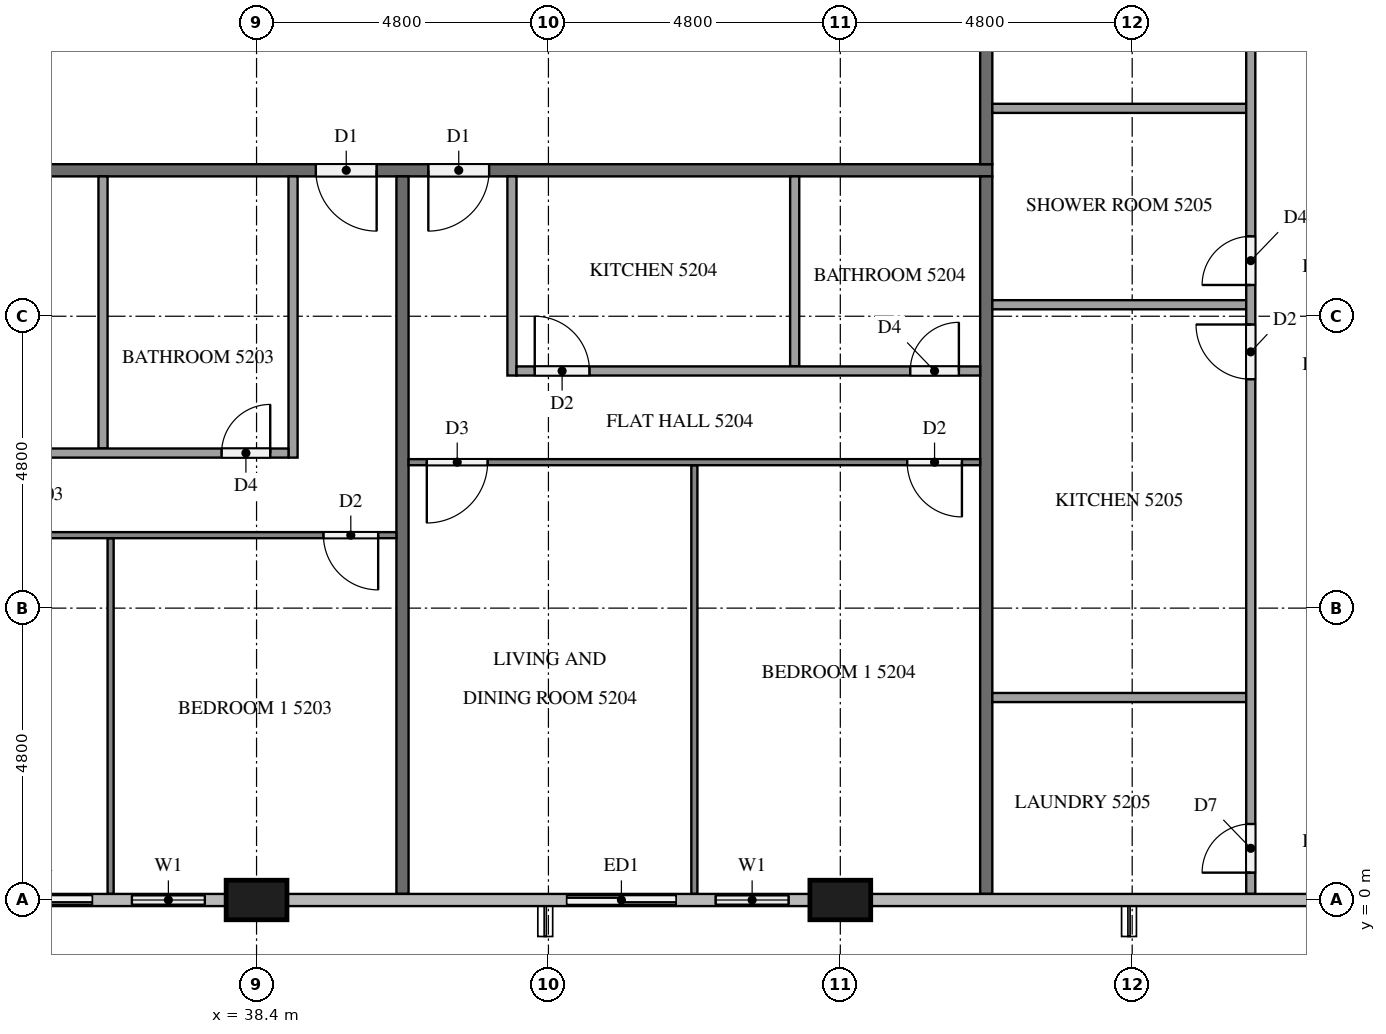
"""IFC4 building model, lengths in metres.
Left out: names, types, materials, properties, quantities, classifications, styles, units other than length and angle.
Written with IfcOpenShell. Run it as: python <this file> out.ifc"""

import sys

from ifc_helpers import new_model, si_unit, direction, frame, frame_2d, origin, origin_2d, place, context, subcontext, project, spatial, rectangle, extrude, element, fill, save


model = new_model("IFC4")
c1 = context("Model", 3, precision=1e-05, world=origin(), true_north=direction((0.0, 1.0)))
c2 = subcontext(c1, "Body", "Model", "MODEL_VIEW")
j1 = project(units=[si_unit("LENGTHUNIT", "METRE"), si_unit("PLANEANGLEUNIT", "RADIAN")], contexts=[c1])
p1 = place(None, origin())
s1 = spatial("IfcSite", under=j1, at=p1, CompositionType="ELEMENT")
p2 = place(p1, origin())
s2 = spatial("IfcBuilding", under=s1, at=p2, CompositionType="ELEMENT")
p3 = place(p2, frame((0.0, 0.0, 199.9)))
s3 = spatial("IfcBuildingStorey", under=s2, at=p3, CompositionType="ELEMENT", Elevation=199.9)
for number, where, z_axis, x_axis in (
    (1, (38.4, 0.0, 0.0), (0.0, 0.0, 1.0), (1.0, 0.0, 0.0)),
    (2, (48.0, 0.0, 0.0), (0.0, 0.0, 1.0), (1.0, 0.0, 0.0)),
):
    element("IfcColumn", number, at=place(p3, frame(where, z_axis=z_axis, x_axis=x_axis)), inside=s3, PredefinedType="COLUMN", context=c2, shape_type="SweptSolid", body=[
        extrude(rectangle(XDim=1.0, YDim=0.65, at=origin_2d()), origin(), (0.0, 0.0, 1.0), 3.1),
    ])
p4 = place(p3, frame((33.6, 0.0, 0.0), z_axis=(0.0, 0.0, 1.0), x_axis=(1.0, 0.0, 0.0)))
e3 = element("IfcWall", 3, at=p4, inside=s3, PredefinedType="SOLIDWALL", context=c2, shape_type="SweptSolid", body=[
    extrude(rectangle(XDim=4.3, YDim=0.15, at=frame_2d((2.15, 0.0))), origin(), (0.0, 0.0, 1.0), 3.1),
])
p5 = place(p4, frame((0.3, 0.0, 0.0)))
e4 = element("IfcOpeningElement", 4, at=p5, cuts=e3, PredefinedType="OPENING", context=c2, shape_type="SweptSolid", body=[
    extrude(rectangle(XDim=1.8, YDim=2.4, at=frame_2d((0.9, 1.2))), frame((0.0, 0.085, 0.0), z_axis=(0.0, -1.0, 0.0), x_axis=(1.0, 0.0, 0.0)), (0.0, 0.0, 1.0), 0.17),
])
p6 = place(p4, frame((2.75, 0.0, 0.9)))
e5 = element("IfcOpeningElement", 5, at=p6, cuts=e3, PredefinedType="OPENING", context=c2, shape_type="SweptSolid", body=[
    extrude(rectangle(XDim=1.2, YDim=1.4, at=frame_2d((0.6, 0.7))), frame((0.0, 0.085, 0.0), z_axis=(0.0, -1.0, 0.0), x_axis=(1.0, 0.0, 0.0)), (0.0, 0.0, 1.0), 0.17),
])
p7 = place(p3, frame((43.2, 0.0, 0.0), z_axis=(0.0, 0.0, 1.0), x_axis=(1.0, 0.0, 0.0)))
e6 = element("IfcWall", 6, at=p7, inside=s3, PredefinedType="SOLIDWALL", context=c2, shape_type="SweptSolid", body=[
    extrude(rectangle(XDim=4.3, YDim=0.15, at=frame_2d((2.15, 0.0))), origin(), (0.0, 0.0, 1.0), 3.1),
])
p8 = place(p7, frame((0.3, 0.0, 0.0)))
e7 = element("IfcOpeningElement", 7, at=p8, cuts=e6, PredefinedType="OPENING", context=c2, shape_type="SweptSolid", body=[
    extrude(rectangle(XDim=1.8, YDim=2.4, at=frame_2d((0.9, 1.2))), frame((0.0, 0.085, 0.0), z_axis=(0.0, -1.0, 0.0), x_axis=(1.0, 0.0, 0.0)), (0.0, 0.0, 1.0), 0.17),
])
p9 = place(p7, frame((2.75, 0.0, 0.9)))
e8 = element("IfcOpeningElement", 8, at=p9, cuts=e6, PredefinedType="OPENING", context=c2, shape_type="SweptSolid", body=[
    extrude(rectangle(XDim=1.2, YDim=1.4, at=frame_2d((0.6, 0.7))), frame((0.0, 0.085, 0.0), z_axis=(0.0, -1.0, 0.0), x_axis=(1.0, 0.0, 0.0)), (0.0, 0.0, 1.0), 0.17),
])
p10 = place(p3, frame((50.5, 12.0, 0.0), z_axis=(0.0, 0.0, 1.0), x_axis=(-1.0, 0.0, 0.0)))
e9 = element("IfcWall", 9, at=p10, inside=s3, PredefinedType="PARTITIONING", context=c2, shape_type="SweptSolid", body=[
    extrude(rectangle(XDim=38.6, YDim=0.2, at=frame_2d((19.3, 0.0))), origin(), (0.0, 0.0, 1.0), 3.1),
])
p11 = place(p10, frame((26.875, 0.0, 0.0)))
e10 = element("IfcOpeningElement", 10, at=p11, cuts=e9, PredefinedType="OPENING", context=c2, shape_type="SweptSolid", body=[
    extrude(rectangle(XDim=1.1, YDim=2.1, at=frame_2d((0.55, 1.05))), frame((0.0, 0.11, 0.0), z_axis=(0.0, -1.0, 0.0), x_axis=(1.0, 0.0, 0.0)), (0.0, 0.0, 1.0), 0.22),
])
p12 = place(p10, frame((25.075, 0.0, 0.0)))
e11 = element("IfcOpeningElement", 11, at=p12, cuts=e9, PredefinedType="OPENING", context=c2, shape_type="SweptSolid", body=[
    extrude(rectangle(XDim=1.0, YDim=2.1, at=frame_2d((0.5, 1.05))), frame((0.0, 0.11, 0.0), z_axis=(0.0, -1.0, 0.0), x_axis=(1.0, 0.0, 0.0)), (0.0, 0.0, 1.0), 0.22),
])
p13 = place(p10, frame((10.125, 0.0, 0.0)))
e12 = element("IfcOpeningElement", 12, at=p13, cuts=e9, PredefinedType="OPENING", context=c2, shape_type="SweptSolid", body=[
    extrude(rectangle(XDim=1.0, YDim=2.1, at=frame_2d((0.5, 1.05))), frame((0.0, 0.11, 0.0), z_axis=(0.0, -1.0, 0.0), x_axis=(1.0, 0.0, 0.0)), (0.0, 0.0, 1.0), 0.22),
])
p14 = place(p10, frame((8.275, 0.0, 0.0)))
e13 = element("IfcOpeningElement", 13, at=p14, cuts=e9, PredefinedType="OPENING", context=c2, shape_type="SweptSolid", body=[
    extrude(rectangle(XDim=1.0, YDim=2.1, at=frame_2d((0.5, 1.05))), frame((0.0, 0.11, 0.0), z_axis=(0.0, -1.0, 0.0), x_axis=(1.0, 0.0, 0.0)), (0.0, 0.0, 1.0), 0.22),
])
p15 = place(p3, frame((50.4, 40.7, 0.0), z_axis=(0.0, 0.0, 1.0), x_axis=(0.0, -1.0, 0.0)))
e14 = element("IfcWall", 14, at=p15, inside=s3, PredefinedType="PARTITIONING", context=c2, shape_type="SweptSolid", body=[
    extrude(rectangle(XDim=28.6, YDim=0.2, at=frame_2d((14.3, 0.0))), origin(), (0.0, 0.0, 1.0), 3.1),
])
p16 = place(p15, frame((21.875, 0.0, 0.0)))
e15 = element("IfcOpeningElement", 15, at=p16, cuts=e14, PredefinedType="OPENING", context=c2, shape_type="SweptSolid", body=[
    extrude(rectangle(XDim=1.1, YDim=2.1, at=frame_2d((0.55, 1.05))), frame((0.0, 0.11, 0.0), z_axis=(0.0, -1.0, 0.0), x_axis=(1.0, 0.0, 0.0)), (0.0, 0.0, 1.0), 0.22),
])
p17 = place(p15, frame((7.525, 0.0, 0.0)))
e16 = element("IfcOpeningElement", 16, at=p17, cuts=e14, PredefinedType="OPENING", context=c2, shape_type="SweptSolid", body=[
    extrude(rectangle(XDim=1.0, YDim=2.1, at=frame_2d((0.5, 1.05))), frame((0.0, 0.11, 0.0), z_axis=(0.0, -1.0, 0.0), x_axis=(1.0, 0.0, 0.0)), (0.0, 0.0, 1.0), 0.22),
])
p18 = place(p15, frame((5.675, 0.0, 0.0)))
e17 = element("IfcOpeningElement", 17, at=p18, cuts=e14, PredefinedType="OPENING", context=c2, shape_type="SweptSolid", body=[
    extrude(rectangle(XDim=1.0, YDim=2.1, at=frame_2d((0.5, 1.05))), frame((0.0, 0.11, 0.0), z_axis=(0.0, -1.0, 0.0), x_axis=(1.0, 0.0, 0.0)), (0.0, 0.0, 1.0), 0.22),
])
for number, where, z_axis, x_axis in (
    (18, (40.8, 11.9, 0.0), (0.0, 0.0, 1.0), (0.0, -1.0, 0.0)),
    (19, (50.4, 11.9, 0.0), (0.0, 0.0, 1.0), (0.0, -1.0, 0.0)),
):
    element("IfcWall", number, at=place(p3, frame(where, z_axis=z_axis, x_axis=x_axis)), inside=s3, PredefinedType="PARTITIONING", context=c2, shape_type="SweptSolid", body=[
        extrude(rectangle(XDim=11.8, YDim=0.2, at=frame_2d((5.9, 0.0))), origin(), (0.0, 0.0, 1.0), 3.1),
    ])
p19 = place(p3, frame((36.0, 5.95, 0.0), z_axis=(0.0, 0.0, 1.0), x_axis=(0.0, -1.0, 0.0)))
e20 = element("IfcWall", 20, at=p19, inside=s3, PredefinedType="PARTITIONING", context=c2, shape_type="SweptSolid", body=[
    extrude(rectangle(XDim=5.85, YDim=0.1, at=frame_2d((2.925, 0.0))), origin(), (0.0, 0.0, 1.0), 3.1),
])
p20 = place(p3, frame((40.7, 6.0, 0.0), z_axis=(0.0, 0.0, 1.0), x_axis=(-1.0, 0.0, 0.0)))
e21 = element("IfcWall", 21, at=p20, inside=s3, PredefinedType="PARTITIONING", context=c2, shape_type="SweptSolid", body=[
    extrude(rectangle(XDim=9.4, YDim=0.1, at=frame_2d((4.7, 0.0))), origin(), (0.0, 0.0, 1.0), 3.1),
])
p21 = place(p20, frame((0.3, 0.0, 0.0)))
e22 = element("IfcOpeningElement", 22, at=p21, cuts=e21, PredefinedType="OPENING", context=c2, shape_type="SweptSolid", body=[
    extrude(rectangle(XDim=0.9, YDim=2.1, at=frame_2d((0.45, 1.05))), frame((0.0, 0.06, 0.0), z_axis=(0.0, -1.0, 0.0), x_axis=(1.0, 0.0, 0.0)), (0.0, 0.0, 1.0), 0.12),
])
p22 = place(p20, frame((8.1, 0.0, 0.0)))
e23 = element("IfcOpeningElement", 23, at=p22, cuts=e21, PredefinedType="OPENING", context=c2, shape_type="SweptSolid", body=[
    extrude(rectangle(XDim=1.0, YDim=2.1, at=frame_2d((0.5, 1.05))), frame((0.0, 0.06, 0.0), z_axis=(0.0, -1.0, 0.0), x_axis=(1.0, 0.0, 0.0)), (0.0, 0.0, 1.0), 0.12),
])
p23 = place(p3, frame((35.875, 11.9, 0.0), z_axis=(0.0, 0.0, 1.0), x_axis=(0.0, -1.0, 0.0)))
e24 = element("IfcWall", 24, at=p23, inside=s3, PredefinedType="PARTITIONING", context=c2, shape_type="SweptSolid", body=[
    extrude(rectangle(XDim=4.475, YDim=0.15, at=frame_2d((2.237, 0.0))), origin(), (0.0, 0.0, 1.0), 3.1),
])
p24 = place(p3, frame((39.0, 11.9, 0.0), z_axis=(0.0, 0.0, 1.0), x_axis=(0.0, -1.0, 0.0)))
e25 = element("IfcWall", 25, at=p24, inside=s3, PredefinedType="PARTITIONING", context=c2, shape_type="SweptSolid", body=[
    extrude(rectangle(XDim=4.625, YDim=0.15, at=frame_2d((2.312, 0.0))), origin(), (0.0, 0.0, 1.0), 3.1),
])
p25 = place(p3, frame((31.3, 7.35, 0.0), z_axis=(0.0, 0.0, 1.0), x_axis=(1.0, 0.0, 0.0)))
e26 = element("IfcWall", 26, at=p25, inside=s3, PredefinedType="PARTITIONING", context=c2, shape_type="SweptSolid", body=[
    extrude(rectangle(XDim=7.625, YDim=0.15, at=frame_2d((3.812, 0.0))), origin(), (0.0, 0.0, 1.0), 3.1),
])
p26 = place(p25, frame((6.525, 0.0, 0.0)))
e27 = element("IfcOpeningElement", 27, at=p26, cuts=e26, PredefinedType="OPENING", context=c2, shape_type="SweptSolid", body=[
    extrude(rectangle(XDim=0.8, YDim=2.1, at=frame_2d((0.4, 1.05))), frame((0.0, 0.085, 0.0), z_axis=(0.0, -1.0, 0.0), x_axis=(1.0, 0.0, 0.0)), (0.0, 0.0, 1.0), 0.17),
])
p27 = place(p25, frame((0.35, 0.0, 0.0)))
e28 = element("IfcOpeningElement", 28, at=p27, cuts=e26, PredefinedType="OPENING", context=c2, shape_type="SweptSolid", body=[
    extrude(rectangle(XDim=0.9, YDim=2.1, at=frame_2d((0.45, 1.05))), frame((0.0, 0.085, 0.0), z_axis=(0.0, -1.0, 0.0), x_axis=(1.0, 0.0, 0.0)), (0.0, 0.0, 1.0), 0.17),
])
p28 = place(p3, frame((45.6, 7.15, 0.0), z_axis=(0.0, 0.0, 1.0), x_axis=(0.0, -1.0, 0.0)))
e29 = element("IfcWall", 29, at=p28, inside=s3, PredefinedType="PARTITIONING", context=c2, shape_type="SweptSolid", body=[
    extrude(rectangle(XDim=7.05, YDim=0.1, at=frame_2d((3.525, 0.0))), origin(), (0.0, 0.0, 1.0), 3.1),
])
p29 = place(p3, frame((50.3, 7.2, 0.0), z_axis=(0.0, 0.0, 1.0), x_axis=(-1.0, 0.0, 0.0)))
e30 = element("IfcWall", 30, at=p29, inside=s3, PredefinedType="PARTITIONING", context=c2, shape_type="SweptSolid", body=[
    extrude(rectangle(XDim=9.4, YDim=0.1, at=frame_2d((4.7, 0.0))), origin(), (0.0, 0.0, 1.0), 3.1),
])
p30 = place(p29, frame((8.1, 0.0, 0.0)))
e31 = element("IfcOpeningElement", 31, at=p30, cuts=e30, PredefinedType="OPENING", context=c2, shape_type="SweptSolid", body=[
    extrude(rectangle(XDim=1.0, YDim=2.1, at=frame_2d((0.5, 1.05))), frame((0.0, 0.06, 0.0), z_axis=(0.0, -1.0, 0.0), x_axis=(1.0, 0.0, 0.0)), (0.0, 0.0, 1.0), 0.12),
])
p31 = place(p29, frame((0.3, 0.0, 0.0)))
e32 = element("IfcOpeningElement", 32, at=p31, cuts=e30, PredefinedType="OPENING", context=c2, shape_type="SweptSolid", body=[
    extrude(rectangle(XDim=0.9, YDim=2.1, at=frame_2d((0.45, 1.05))), frame((0.0, 0.06, 0.0), z_axis=(0.0, -1.0, 0.0), x_axis=(1.0, 0.0, 0.0)), (0.0, 0.0, 1.0), 0.12),
])
p32 = place(p3, frame((47.25, 11.9, 0.0), z_axis=(0.0, 0.0, 1.0), x_axis=(0.0, -1.0, 0.0)))
e33 = element("IfcWall", 33, at=p32, inside=s3, PredefinedType="PARTITIONING", context=c2, shape_type="SweptSolid", body=[
    extrude(rectangle(XDim=3.125, YDim=0.15, at=frame_2d((1.562, 0.0))), origin(), (0.0, 0.0, 1.0), 3.1),
])
p33 = place(p3, frame((42.6, 11.9, 0.0), z_axis=(0.0, 0.0, 1.0), x_axis=(0.0, -1.0, 0.0)))
e34 = element("IfcWall", 34, at=p33, inside=s3, PredefinedType="PARTITIONING", context=c2, shape_type="SweptSolid", body=[
    extrude(rectangle(XDim=3.275, YDim=0.15, at=frame_2d((1.637, 0.0))), origin(), (0.0, 0.0, 1.0), 3.1),
])
p34 = place(p3, frame((42.675, 8.7, 0.0), z_axis=(0.0, 0.0, 1.0), x_axis=(1.0, 0.0, 0.0)))
e35 = element("IfcWall", 35, at=p34, inside=s3, PredefinedType="PARTITIONING", context=c2, shape_type="SweptSolid", body=[
    extrude(rectangle(XDim=7.625, YDim=0.15, at=frame_2d((3.812, 0.0))), origin(), (0.0, 0.0, 1.0), 3.1),
])
p35 = place(p34, frame((0.3, 0.0, 0.0)))
e36 = element("IfcOpeningElement", 36, at=p35, cuts=e35, PredefinedType="OPENING", context=c2, shape_type="SweptSolid", body=[
    extrude(rectangle(XDim=0.9, YDim=2.1, at=frame_2d((0.45, 1.05))), frame((0.0, 0.085, 0.0), z_axis=(0.0, -1.0, 0.0), x_axis=(1.0, 0.0, 0.0)), (0.0, 0.0, 1.0), 0.17),
])
p36 = place(p34, frame((6.475, 0.0, 0.0)))
e37 = element("IfcOpeningElement", 37, at=p36, cuts=e35, PredefinedType="OPENING", context=c2, shape_type="SweptSolid", body=[
    extrude(rectangle(XDim=0.8, YDim=2.1, at=frame_2d((0.4, 1.05))), frame((0.0, 0.085, 0.0), z_axis=(0.0, -1.0, 0.0), x_axis=(1.0, 0.0, 0.0)), (0.0, 0.0, 1.0), 0.17),
])
for number, where, z_axis, x_axis in (
    (38, (50.5, 13.019, 0.0), (0.0, 0.0, 1.0), (1.0, 0.0, 0.0)),
    (39, (50.5, 9.789, 0.0), (0.0, 0.0, 1.0), (1.0, 0.0, 0.0)),
    (40, (50.5, 3.33, 0.0), (0.0, 0.0, 1.0), (1.0, 0.0, 0.0)),
):
    element("IfcWall", number, at=place(p3, frame(where, z_axis=z_axis, x_axis=x_axis)), inside=s3, PredefinedType="PARTITIONING", context=c2, shape_type="SweptSolid", body=[
        extrude(rectangle(XDim=4.175, YDim=0.15, at=frame_2d((2.087, 0.0))), origin(), (0.0, 0.0, 1.0), 3.1),
    ])
p37 = place(p3, frame((54.75, 0.1, 0.0), z_axis=(0.0, 0.0, 1.0), x_axis=(0.0, 1.0, 0.0)))
e41 = element("IfcWall", 41, at=p37, inside=s3, PredefinedType="PARTITIONING", context=c2, shape_type="SweptSolid", body=[
    extrude(rectangle(XDim=17.225, YDim=0.15, at=frame_2d((8.612, 0.0))), origin(), (0.0, 0.0, 1.0), 3.1),
])
p38 = place(p37, frame((16.025, 0.0, 0.0)))
e42 = element("IfcOpeningElement", 42, at=p38, cuts=e41, PredefinedType="OPENING", context=c2, shape_type="SweptSolid", body=[
    extrude(rectangle(XDim=0.9, YDim=2.1, at=frame_2d((0.45, 1.05))), frame((0.0, 0.085, 0.0), z_axis=(0.0, -1.0, 0.0), x_axis=(1.0, 0.0, 0.0)), (0.0, 0.0, 1.0), 0.17),
])
p39 = place(p37, frame((10.014, 0.0, 0.0)))
e43 = element("IfcOpeningElement", 43, at=p39, cuts=e41, PredefinedType="OPENING", context=c2, shape_type="SweptSolid", body=[
    extrude(rectangle(XDim=0.8, YDim=2.1, at=frame_2d((0.4, 1.05))), frame((0.0, 0.085, 0.0), z_axis=(0.0, -1.0, 0.0), x_axis=(1.0, 0.0, 0.0)), (0.0, 0.0, 1.0), 0.17),
])
p40 = place(p37, frame((8.464, 0.0, 0.0)))
e44 = element("IfcOpeningElement", 44, at=p40, cuts=e41, PredefinedType="OPENING", context=c2, shape_type="SweptSolid", body=[
    extrude(rectangle(XDim=0.9, YDim=2.1, at=frame_2d((0.45, 1.05))), frame((0.0, 0.085, 0.0), z_axis=(0.0, -1.0, 0.0), x_axis=(1.0, 0.0, 0.0)), (0.0, 0.0, 1.0), 0.17),
])
p41 = place(p37, frame((0.35, 0.0, 0.0)))
e45 = element("IfcOpeningElement", 45, at=p41, cuts=e41, PredefinedType="OPENING", context=c2, shape_type="SweptSolid", body=[
    extrude(rectangle(XDim=0.8, YDim=2.1, at=frame_2d((0.4, 1.05))), frame((0.0, 0.085, 0.0), z_axis=(0.0, -1.0, 0.0), x_axis=(1.0, 0.0, 0.0)), (0.0, 0.0, 1.0), 0.17),
])
p42 = place(p5, origin())
e46 = element("IfcDoor", 46, at=p42, inside=s3, OperationType="SLIDING_TO_RIGHT", PredefinedType="DOOR", context=c2, shape_type="SweptSolid", body=[
    extrude(rectangle(XDim=1.8, YDim=2.4, at=frame_2d((0.9, 1.2))), frame((0.0, 0.025, 0.0), z_axis=(0.0, -1.0, 0.0), x_axis=(1.0, 0.0, 0.0)), (0.0, 0.0, 1.0), 0.05),
])
fill(e4, e46)
p43 = place(p6, origin())
e47 = element("IfcWindow", 47, at=p43, inside=s3, PartitioningType="SINGLE_PANEL", PredefinedType="WINDOW", context=c2, shape_type="SweptSolid", body=[
    extrude(rectangle(XDim=1.2, YDim=1.4, at=frame_2d((0.6, 0.7))), frame((0.0, 0.03, 0.0), z_axis=(0.0, -1.0, 0.0), x_axis=(1.0, 0.0, 0.0)), (0.0, 0.0, 1.0), 0.06),
])
fill(e5, e47)
p44 = place(p8, origin())
e48 = element("IfcDoor", 48, at=p44, inside=s3, OperationType="SLIDING_TO_LEFT", PredefinedType="DOOR", context=c2, shape_type="SweptSolid", body=[
    extrude(rectangle(XDim=1.8, YDim=2.4, at=frame_2d((0.9, 1.2))), frame((0.0, 0.025, 0.0), z_axis=(0.0, -1.0, 0.0), x_axis=(1.0, 0.0, 0.0)), (0.0, 0.0, 1.0), 0.05),
])
fill(e7, e48)
p45 = place(p9, origin())
e49 = element("IfcWindow", 49, at=p45, inside=s3, PartitioningType="SINGLE_PANEL", PredefinedType="WINDOW", context=c2, shape_type="SweptSolid", body=[
    extrude(rectangle(XDim=1.2, YDim=1.4, at=frame_2d((0.6, 0.7))), frame((0.0, 0.03, 0.0), z_axis=(0.0, -1.0, 0.0), x_axis=(1.0, 0.0, 0.0)), (0.0, 0.0, 1.0), 0.06),
])
fill(e8, e49)
p46 = place(p13, origin())
e50 = element("IfcDoor", 50, at=p46, inside=s3, OperationType="SINGLE_SWING_LEFT", PredefinedType="DOOR", context=c2, shape_type="SweptSolid", body=[
    extrude(rectangle(XDim=1.0, YDim=2.1, at=frame_2d((0.5, 1.05))), frame((0.0, 0.025, 0.0), z_axis=(0.0, -1.0, 0.0), x_axis=(1.0, 0.0, 0.0)), (0.0, 0.0, 1.0), 0.05),
])
fill(e12, e50)
p47 = place(p14, origin())
e51 = element("IfcDoor", 51, at=p47, inside=s3, OperationType="SINGLE_SWING_RIGHT", PredefinedType="DOOR", context=c2, shape_type="SweptSolid", body=[
    extrude(rectangle(XDim=1.0, YDim=2.1, at=frame_2d((0.5, 1.05))), frame((0.0, 0.025, 0.0), z_axis=(0.0, -1.0, 0.0), x_axis=(1.0, 0.0, 0.0)), (0.0, 0.0, 1.0), 0.05),
])
fill(e13, e51)
p48 = place(p21, origin())
e52 = element("IfcDoor", 52, at=p48, inside=s3, OperationType="SINGLE_SWING_LEFT", PredefinedType="DOOR", context=c2, shape_type="SweptSolid", body=[
    extrude(rectangle(XDim=0.9, YDim=2.1, at=frame_2d((0.45, 1.05))), frame((0.0, 0.025, 0.0), z_axis=(0.0, -1.0, 0.0), x_axis=(1.0, 0.0, 0.0)), (0.0, 0.0, 1.0), 0.05),
])
fill(e22, e52)
p49 = place(p26, origin())
e53 = element("IfcDoor", 53, at=p49, inside=s3, OperationType="SINGLE_SWING_RIGHT", PredefinedType="DOOR", context=c2, shape_type="SweptSolid", body=[
    extrude(rectangle(XDim=0.8, YDim=2.1, at=frame_2d((0.4, 1.05))), frame((0.0, 0.025, 0.0), z_axis=(0.0, -1.0, 0.0), x_axis=(1.0, 0.0, 0.0)), (0.0, 0.0, 1.0), 0.05),
])
fill(e27, e53)
p50 = place(p30, origin())
e54 = element("IfcDoor", 54, at=p50, inside=s3, OperationType="SINGLE_SWING_RIGHT", PredefinedType="DOOR", context=c2, shape_type="SweptSolid", body=[
    extrude(rectangle(XDim=1.0, YDim=2.1, at=frame_2d((0.5, 1.05))), frame((0.0, 0.025, 0.0), z_axis=(0.0, -1.0, 0.0), x_axis=(1.0, 0.0, 0.0)), (0.0, 0.0, 1.0), 0.05),
])
fill(e31, e54)
p51 = place(p31, origin())
e55 = element("IfcDoor", 55, at=p51, inside=s3, OperationType="SINGLE_SWING_LEFT", PredefinedType="DOOR", context=c2, shape_type="SweptSolid", body=[
    extrude(rectangle(XDim=0.9, YDim=2.1, at=frame_2d((0.45, 1.05))), frame((0.0, 0.025, 0.0), z_axis=(0.0, -1.0, 0.0), x_axis=(1.0, 0.0, 0.0)), (0.0, 0.0, 1.0), 0.05),
])
fill(e32, e55)
p52 = place(p35, origin())
e56 = element("IfcDoor", 56, at=p52, inside=s3, OperationType="SINGLE_SWING_LEFT", PredefinedType="DOOR", context=c2, shape_type="SweptSolid", body=[
    extrude(rectangle(XDim=0.9, YDim=2.1, at=frame_2d((0.45, 1.05))), frame((0.0, 0.025, 0.0), z_axis=(0.0, -1.0, 0.0), x_axis=(1.0, 0.0, 0.0)), (0.0, 0.0, 1.0), 0.05),
])
fill(e36, e56)
p53 = place(p36, origin())
e57 = element("IfcDoor", 57, at=p53, inside=s3, OperationType="SINGLE_SWING_RIGHT", PredefinedType="DOOR", context=c2, shape_type="SweptSolid", body=[
    extrude(rectangle(XDim=0.8, YDim=2.1, at=frame_2d((0.4, 1.05))), frame((0.0, 0.025, 0.0), z_axis=(0.0, -1.0, 0.0), x_axis=(1.0, 0.0, 0.0)), (0.0, 0.0, 1.0), 0.05),
])
fill(e37, e57)
p54 = place(p39, origin())
e58 = element("IfcDoor", 58, at=p54, inside=s3, OperationType="SINGLE_SWING_LEFT", PredefinedType="DOOR", context=c2, shape_type="SweptSolid", body=[
    extrude(rectangle(XDim=0.8, YDim=2.1, at=frame_2d((0.4, 1.05))), frame((0.0, 0.025, 0.0), z_axis=(0.0, -1.0, 0.0), x_axis=(1.0, 0.0, 0.0)), (0.0, 0.0, 1.0), 0.05),
])
fill(e43, e58)
p55 = place(p40, origin())
e59 = element("IfcDoor", 59, at=p55, inside=s3, OperationType="SINGLE_SWING_RIGHT", PredefinedType="DOOR", context=c2, shape_type="SweptSolid", body=[
    extrude(rectangle(XDim=0.9, YDim=2.1, at=frame_2d((0.45, 1.05))), frame((0.0, 0.025, 0.0), z_axis=(0.0, -1.0, 0.0), x_axis=(1.0, 0.0, 0.0)), (0.0, 0.0, 1.0), 0.05),
])
fill(e44, e59)
p56 = place(p41, origin())
e60 = element("IfcDoor", 60, at=p56, inside=s3, OperationType="SINGLE_SWING_LEFT", PredefinedType="DOOR", context=c2, shape_type="SweptSolid", body=[
    extrude(rectangle(XDim=0.8, YDim=2.1, at=frame_2d((0.4, 1.05))), frame((0.0, 0.025, 0.0), z_axis=(0.0, -1.0, 0.0), x_axis=(1.0, 0.0, 0.0)), (0.0, 0.0, 1.0), 0.05),
])
fill(e45, e60)
save(model, sys.argv[1])
